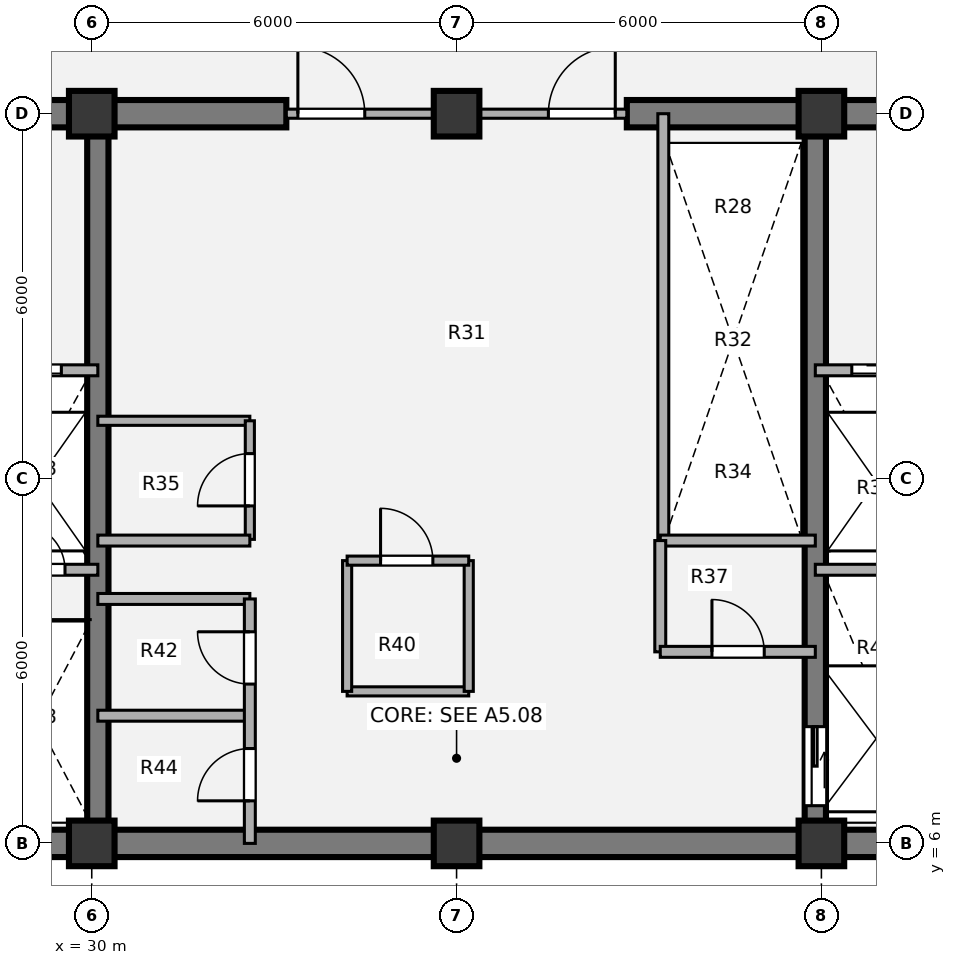
"""IFC4 building model, lengths in metres.
Left out: names, types, materials, properties, quantities, classifications, styles, units other than length and angle.
Written with IfcOpenShell. Run it as: python <this file> out.ifc"""

import sys

from ifc_helpers import new_model, si_unit, direction, frame, frame_2d, origin, origin_2d, place, context, subcontext, project, spatial, rectangle, extrude, source, transform, mapped, element, fill, save


model = new_model("IFC4")
c1 = context("Model", 3, precision=1e-05, world=origin(), true_north=direction((0.0, 1.0)))
c2 = subcontext(c1, "Body", "Model", "MODEL_VIEW")
j1 = project(units=[si_unit("LENGTHUNIT", "METRE"), si_unit("PLANEANGLEUNIT", "RADIAN")], contexts=[c1])
p1 = place(None, origin())
s1 = spatial("IfcSite", under=j1, at=p1, CompositionType="ELEMENT")
p2 = place(p1, origin())
s2 = spatial("IfcBuilding", under=s1, at=p2, CompositionType="ELEMENT")
p3 = place(p2, frame((0.0, 0.0, 194.22)))
s3 = spatial("IfcBuildingStorey", under=s2, at=p3, CompositionType="ELEMENT", Elevation=194.22)
m1 = source(origin(), c2, "Body", "SweptSolid", [
    extrude(rectangle(XDim=0.75, YDim=0.75, at=origin_2d()), origin(), (0.0, 0.0, 1.0), 3.78),
])
for number, where, z_axis, x_axis in (
    (1, (30.0, 6.0, 0.0), (0.0, 0.0, 1.0), (1.0, 0.0, 0.0)),
    (2, (36.0, 6.0, 0.0), (0.0, 0.0, 1.0), (1.0, 0.0, 0.0)),
    (3, (42.0, 6.0, 0.0), (0.0, 0.0, 1.0), (1.0, 0.0, 0.0)),
    (4, (30.0, 18.0, 0.0), (0.0, 0.0, 1.0), (1.0, 0.0, 0.0)),
    (5, (36.0, 18.0, 0.0), (0.0, 0.0, 1.0), (1.0, 0.0, 0.0)),
    (6, (42.0, 18.0, 0.0), (0.0, 0.0, 1.0), (1.0, 0.0, 0.0)),
):
    element("IfcColumn", number, at=place(p3, frame(where, z_axis=z_axis, x_axis=x_axis)), inside=s3, PredefinedType="COLUMN", context=c2, shape_type="MappedRepresentation", body=[
        mapped(m1, transform((0.0, 0.0, 0.0), x_axis=(1.0, 0.0, 0.0), y_axis=(0.0, 1.0, 0.0), z_axis=(0.0, 0.0, 1.0), scale=1.0)),
    ])
p4 = place(p3, frame((48.225, 6.0, 0.0), z_axis=(0.0, 0.0, 1.0), x_axis=(-1.0, 0.0, 0.0)))
e7 = element("IfcWall", 7, at=p4, inside=s3, PredefinedType="SHEAR", context=c2, shape_type="SweptSolid", body=[
    extrude(rectangle(XDim=24.45, YDim=0.45, at=frame_2d((12.225, 0.0))), origin(), (0.0, 0.0, 1.0), 3.78),
])
p5 = place(p3, frame((23.775, 18.0, 0.0), z_axis=(0.0, 0.0, 1.0), x_axis=(1.0, 0.0, 0.0)))
e8 = element("IfcWall", 8, at=p5, inside=s3, PredefinedType="SHEAR", context=c2, shape_type="SweptSolid", body=[
    extrude(rectangle(XDim=9.425, YDim=0.45, at=frame_2d((4.712, 0.0))), origin(), (0.0, 0.0, 1.0), 3.78),
])
p6 = place(p5, frame((2.95, 0.0, 0.0)))
e9 = element("IfcOpeningElement", 9, at=p6, cuts=e8, PredefinedType="OPENING", context=c2, shape_type="SweptSolid", body=[
    extrude(rectangle(XDim=1.1, YDim=2.1, at=origin_2d()), frame((0.55, 0.235, 1.05), z_axis=(0.0, -1.0, 0.0), x_axis=(1.0, 0.0, 0.0)), (0.0, 0.0, 1.0), 0.47),
])
p7 = place(p3, frame((38.8, 18.0, 0.0), z_axis=(0.0, 0.0, 1.0), x_axis=(1.0, 0.0, 0.0)))
e10 = element("IfcWall", 10, at=p7, inside=s3, PredefinedType="SHEAR", context=c2, shape_type="SweptSolid", body=[
    extrude(rectangle(XDim=9.425, YDim=0.45, at=frame_2d((4.712, 0.0))), origin(), (0.0, 0.0, 1.0), 3.78),
])
p8 = place(p7, frame((5.45, 0.0, 0.0)))
e11 = element("IfcOpeningElement", 11, at=p8, cuts=e10, PredefinedType="OPENING", context=c2, shape_type="SweptSolid", body=[
    extrude(rectangle(XDim=1.1, YDim=2.1, at=origin_2d()), frame((0.55, 0.235, 1.05), z_axis=(0.0, -1.0, 0.0), x_axis=(1.0, 0.0, 0.0)), (0.0, 0.0, 1.0), 0.47),
])
p9 = place(p3, frame((30.1, 6.0, 0.0), z_axis=(0.0, 0.0, 1.0), x_axis=(0.0, 1.0, 0.0)))
e12 = element("IfcWall", 12, at=p9, inside=s3, PredefinedType="SHEAR", context=c2, shape_type="SweptSolid", body=[
    extrude(rectangle(XDim=12.0, YDim=0.35, at=frame_2d((6.0, 0.0))), origin(), (0.0, 0.0, 1.0), 3.78),
])
p10 = place(p3, frame((41.9, 18.0, 0.0), z_axis=(0.0, 0.0, 1.0), x_axis=(0.0, -1.0, 0.0)))
e13 = element("IfcWall", 13, at=p10, inside=s3, PredefinedType="SHEAR", context=c2, shape_type="SweptSolid", body=[
    extrude(rectangle(XDim=12.0, YDim=0.35, at=frame_2d((6.0, 0.0))), origin(), (0.0, 0.0, 1.0), 3.78),
])
p11 = place(p10, frame((10.08, 0.0, 0.0)))
e14 = element("IfcOpeningElement", 14, at=p11, cuts=e13, PredefinedType="OPENING", context=c2, shape_type="SweptSolid", body=[
    extrude(rectangle(XDim=1.3, YDim=2.1, at=origin_2d()), frame((0.65, 0.185, 1.05), z_axis=(0.0, -1.0, 0.0), x_axis=(1.0, 0.0, 0.0)), (0.0, 0.0, 1.0), 0.37),
])
p12 = place(p3, frame((30.1, 12.95, 0.0), z_axis=(0.0, 0.0, 1.0), x_axis=(1.0, 0.0, 0.0)))
e15 = element("IfcWall", 15, at=p12, inside=s3, PredefinedType="PARTITIONING", context=c2, shape_type="SweptSolid", body=[
    extrude(rectangle(XDim=2.5, YDim=0.15, at=frame_2d((1.25, 0.0))), origin(), (0.0, 0.0, 1.0), 3.5),
])
p13 = place(p3, frame((32.6, 11.0, 0.0), z_axis=(0.0, 0.0, 1.0), x_axis=(0.0, 1.0, 0.0)))
e16 = element("IfcWall", 16, at=p13, inside=s3, PredefinedType="PARTITIONING", context=c2, shape_type="SweptSolid", body=[
    extrude(rectangle(XDim=1.95, YDim=0.15, at=frame_2d((0.975, 0.0))), origin(), (0.0, 0.0, 1.0), 3.5),
])
p14 = place(p13, frame((0.55, 0.0, 0.0)))
e17 = element("IfcOpeningElement", 17, at=p14, cuts=e16, PredefinedType="OPENING", context=c2, shape_type="SweptSolid", body=[
    extrude(rectangle(XDim=0.86, YDim=2.1, at=origin_2d()), frame((0.43, 0.085, 1.05), z_axis=(0.0, -1.0, 0.0), x_axis=(1.0, 0.0, 0.0)), (0.0, 0.0, 1.0), 0.17),
])
p15 = place(p3, frame((34.2, 8.5, 0.0), z_axis=(0.0, 0.0, 1.0), x_axis=(1.0, 0.0, 0.0)))
e18 = element("IfcWall", 18, at=p15, inside=s3, PredefinedType="PARTITIONING", context=c2, shape_type="SweptSolid", body=[
    extrude(rectangle(XDim=2.0, YDim=0.15, at=frame_2d((1.0, 0.0))), origin(), (0.0, 0.0, 1.0), 3.5),
])
p16 = place(p3, frame((34.2, 8.5, 0.0), z_axis=(0.0, 0.0, 1.0), x_axis=(0.0, 1.0, 0.0)))
e19 = element("IfcWall", 19, at=p16, inside=s3, PredefinedType="PARTITIONING", context=c2, shape_type="SweptSolid", body=[
    extrude(rectangle(XDim=2.15, YDim=0.15, at=frame_2d((1.075, 0.0))), origin(), (0.0, 0.0, 1.0), 3.5),
])
p17 = place(p3, frame((36.2, 8.5, 0.0), z_axis=(0.0, 0.0, 1.0), x_axis=(0.0, 1.0, 0.0)))
e20 = element("IfcWall", 20, at=p17, inside=s3, PredefinedType="PARTITIONING", context=c2, shape_type="SweptSolid", body=[
    extrude(rectangle(XDim=2.15, YDim=0.15, at=frame_2d((1.075, 0.0))), origin(), (0.0, 0.0, 1.0), 2.715),
])
p18 = place(p3, frame((34.2, 10.65, 0.0), z_axis=(0.0, 0.0, 1.0), x_axis=(1.0, 0.0, 0.0)))
e21 = element("IfcWall", 21, at=p18, inside=s3, PredefinedType="PARTITIONING", context=c2, shape_type="SweptSolid", body=[
    extrude(rectangle(XDim=2.0, YDim=0.15, at=frame_2d((1.0, 0.0))), origin(), (0.0, 0.0, 1.0), 3.5),
])
p19 = place(p18, frame((0.55, 0.0, 0.0)))
e22 = element("IfcOpeningElement", 22, at=p19, cuts=e21, PredefinedType="OPENING", context=c2, shape_type="SweptSolid", body=[
    extrude(rectangle(XDim=0.86, YDim=2.1, at=origin_2d()), frame((0.43, 0.085, 1.05), z_axis=(0.0, -1.0, 0.0), x_axis=(1.0, 0.0, 0.0)), (0.0, 0.0, 1.0), 0.17),
])
p20 = place(p3, frame((39.4, 11.0, 0.0), z_axis=(0.0, 0.0, 1.0), x_axis=(0.0, 1.0, 0.0)))
e23 = element("IfcWall", 23, at=p20, inside=s3, PredefinedType="PARTITIONING", context=c2, shape_type="SweptSolid", body=[
    extrude(rectangle(XDim=7.0, YDim=0.18, at=frame_2d((3.5, 0.0))), origin(), (0.0, 0.0, 1.0), 3.5),
])
p21 = place(p3, frame((30.1, 10.98, 0.0), z_axis=(0.0, 0.0, 1.0), x_axis=(1.0, 0.0, 0.0)))
e24 = element("IfcWall", 24, at=p21, inside=s3, PredefinedType="PARTITIONING", context=c2, shape_type="SweptSolid", body=[
    extrude(rectangle(XDim=2.5, YDim=0.18, at=frame_2d((1.25, 0.0))), origin(), (0.0, 0.0, 1.0), 3.5),
])
p22 = place(p3, frame((39.35, 10.98, 0.0), z_axis=(0.0, 0.0, 1.0), x_axis=(1.0, 0.0, 0.0)))
e25 = element("IfcWall", 25, at=p22, inside=s3, PredefinedType="PARTITIONING", context=c2, shape_type="SweptSolid", body=[
    extrude(rectangle(XDim=2.55, YDim=0.18, at=frame_2d((1.275, 0.0))), origin(), (0.0, 0.0, 1.0), 3.5),
])
for number, where, z_axis, x_axis in (
    (26, (30.1, 8.1, 0.0), (0.0, 0.0, 1.0), (1.0, 0.0, 0.0)),
    (27, (30.1, 10.02, 0.0), (0.0, 0.0, 1.0), (1.0, 0.0, 0.0)),
):
    element("IfcWall", number, at=place(p3, frame(where, z_axis=z_axis, x_axis=x_axis)), inside=s3, PredefinedType="PARTITIONING", context=c2, shape_type="SweptSolid", body=[
        extrude(rectangle(XDim=2.5, YDim=0.18, at=frame_2d((1.25, 0.0))), origin(), (0.0, 0.0, 1.0), 3.5),
    ])
p23 = place(p3, frame((32.6, 6.0, 0.0), z_axis=(0.0, 0.0, 1.0), x_axis=(0.0, 1.0, 0.0)))
e28 = element("IfcWall", 28, at=p23, inside=s3, PredefinedType="PARTITIONING", context=c2, shape_type="SweptSolid", body=[
    extrude(rectangle(XDim=4.02, YDim=0.18, at=frame_2d((2.01, 0.0))), origin(), (0.0, 0.0, 1.0), 3.5),
])
p24 = place(p23, frame((0.7, 0.0, 0.0)))
e29 = element("IfcOpeningElement", 29, at=p24, cuts=e28, PredefinedType="OPENING", context=c2, shape_type="SweptSolid", body=[
    extrude(rectangle(XDim=0.86, YDim=2.1, at=origin_2d()), frame((0.43, 0.1, 1.05), z_axis=(0.0, -1.0, 0.0), x_axis=(1.0, 0.0, 0.0)), (0.0, 0.0, 1.0), 0.2),
])
p25 = place(p23, frame((2.62, 0.0, 0.0)))
e30 = element("IfcOpeningElement", 30, at=p25, cuts=e28, PredefinedType="OPENING", context=c2, shape_type="SweptSolid", body=[
    extrude(rectangle(XDim=0.86, YDim=2.1, at=origin_2d()), frame((0.43, 0.1, 1.05), z_axis=(0.0, -1.0, 0.0), x_axis=(1.0, 0.0, 0.0)), (0.0, 0.0, 1.0), 0.2),
])
p26 = place(p3, frame((39.35, 9.15, 0.0), z_axis=(0.0, 0.0, 1.0), x_axis=(0.0, 1.0, 0.0)))
e31 = element("IfcWall", 31, at=p26, inside=s3, PredefinedType="PARTITIONING", context=c2, shape_type="SweptSolid", body=[
    extrude(rectangle(XDim=1.83, YDim=0.18, at=frame_2d((0.915, 0.0))), origin(), (0.0, 0.0, 1.0), 3.5),
])
p27 = place(p3, frame((39.35, 9.15, 0.0), z_axis=(0.0, 0.0, 1.0), x_axis=(1.0, 0.0, 0.0)))
e32 = element("IfcWall", 32, at=p27, inside=s3, PredefinedType="PARTITIONING", context=c2, shape_type="SweptSolid", body=[
    extrude(rectangle(XDim=2.55, YDim=0.18, at=frame_2d((1.275, 0.0))), origin(), (0.0, 0.0, 1.0), 3.5),
])
p28 = place(p27, frame((0.85, 0.0, 0.0)))
e33 = element("IfcOpeningElement", 33, at=p28, cuts=e32, PredefinedType="OPENING", context=c2, shape_type="SweptSolid", body=[
    extrude(rectangle(XDim=0.86, YDim=2.1, at=origin_2d()), frame((0.43, 0.1, 1.05), z_axis=(0.0, -1.0, 0.0), x_axis=(1.0, 0.0, 0.0)), (0.0, 0.0, 1.0), 0.2),
])
p29 = place(p3, frame((33.2, 18.0, 0.0), z_axis=(0.0, 0.0, 1.0), x_axis=(1.0, 0.0, 0.0)))
e34 = element("IfcWall", 34, at=p29, inside=s3, PredefinedType="PARTITIONING", context=c2, shape_type="SweptSolid", body=[
    extrude(rectangle(XDim=5.6, YDim=0.15, at=frame_2d((2.8, 0.0))), origin(), (0.0, 0.0, 1.0), 2.515),
])
p30 = place(p29, frame((0.19, 0.0, 0.0)))
e35 = element("IfcOpeningElement", 35, at=p30, cuts=e34, PredefinedType="OPENING", context=c2, shape_type="SweptSolid", body=[
    extrude(rectangle(XDim=1.1, YDim=2.1, at=origin_2d()), frame((0.55, 0.085, 1.05), z_axis=(0.0, -1.0, 0.0), x_axis=(1.0, 0.0, 0.0)), (0.0, 0.0, 1.0), 0.17),
])
p31 = place(p29, frame((4.31, 0.0, 0.0)))
e36 = element("IfcOpeningElement", 36, at=p31, cuts=e34, PredefinedType="OPENING", context=c2, shape_type="SweptSolid", body=[
    extrude(rectangle(XDim=1.1, YDim=2.1, at=origin_2d()), frame((0.55, 0.085, 1.05), z_axis=(0.0, -1.0, 0.0), x_axis=(1.0, 0.0, 0.0)), (0.0, 0.0, 1.0), 0.17),
])
p32 = place(p3, frame((24.0, 13.78, 0.0), z_axis=(0.0, 0.0, 1.0), x_axis=(1.0, 0.0, 0.0)))
e37 = element("IfcWall", 37, at=p32, inside=s3, PredefinedType="PARTITIONING", context=c2, shape_type="SweptSolid", body=[
    extrude(rectangle(XDim=6.1, YDim=0.18, at=frame_2d((3.05, 0.0))), origin(), (0.0, 0.0, 1.0), 3.5),
])
p33 = place(p32, frame((1.15, 0.0, 0.0)))
e38 = element("IfcOpeningElement", 38, at=p33, cuts=e37, PredefinedType="OPENING", context=c2, shape_type="SweptSolid", body=[
    extrude(rectangle(XDim=1.1, YDim=2.1, at=origin_2d()), frame((0.55, 0.1, 1.05), z_axis=(0.0, -1.0, 0.0), x_axis=(1.0, 0.0, 0.0)), (0.0, 0.0, 1.0), 0.2),
])
p34 = place(p32, frame((4.4, 0.0, 0.0)))
e39 = element("IfcOpeningElement", 39, at=p34, cuts=e37, PredefinedType="OPENING", context=c2, shape_type="SweptSolid", body=[
    extrude(rectangle(XDim=1.1, YDim=2.1, at=origin_2d()), frame((0.55, 0.1, 1.05), z_axis=(0.0, -1.0, 0.0), x_axis=(1.0, 0.0, 0.0)), (0.0, 0.0, 1.0), 0.2),
])
p35 = place(p3, frame((28.15, 10.5, 0.0), z_axis=(0.0, 0.0, 1.0), x_axis=(1.0, 0.0, 0.0)))
e40 = element("IfcWall", 40, at=p35, inside=s3, PredefinedType="PARTITIONING", context=c2, shape_type="SweptSolid", body=[
    extrude(rectangle(XDim=1.95, YDim=0.18, at=frame_2d((0.975, 0.0))), origin(), (0.0, 0.0, 1.0), 3.5),
])
p36 = place(p35, frame((0.65, 0.0, 0.0)))
e41 = element("IfcOpeningElement", 41, at=p36, cuts=e40, PredefinedType="OPENING", context=c2, shape_type="SweptSolid", body=[
    extrude(rectangle(XDim=0.76, YDim=2.05, at=origin_2d()), frame((0.38, 0.1, 1.025), z_axis=(0.0, -1.0, 0.0), x_axis=(1.0, 0.0, 0.0)), (0.0, 0.0, 1.0), 0.2),
])
p37 = place(p3, frame((41.9, 13.78, 0.0), z_axis=(0.0, 0.0, 1.0), x_axis=(1.0, 0.0, 0.0)))
e42 = element("IfcWall", 42, at=p37, inside=s3, PredefinedType="PARTITIONING", context=c2, shape_type="SweptSolid", body=[
    extrude(rectangle(XDim=6.1, YDim=0.18, at=frame_2d((3.05, 0.0))), origin(), (0.0, 0.0, 1.0), 3.5),
])
p38 = place(p37, frame((0.6, 0.0, 0.0)))
e43 = element("IfcOpeningElement", 43, at=p38, cuts=e42, PredefinedType="OPENING", context=c2, shape_type="SweptSolid", body=[
    extrude(rectangle(XDim=1.1, YDim=2.1, at=origin_2d()), frame((0.55, 0.1, 1.05), z_axis=(0.0, -1.0, 0.0), x_axis=(1.0, 0.0, 0.0)), (0.0, 0.0, 1.0), 0.2),
])
p39 = place(p37, frame((3.8, 0.0, 0.0)))
e44 = element("IfcOpeningElement", 44, at=p39, cuts=e42, PredefinedType="OPENING", context=c2, shape_type="SweptSolid", body=[
    extrude(rectangle(XDim=1.1, YDim=2.1, at=origin_2d()), frame((0.55, 0.1, 1.05), z_axis=(0.0, -1.0, 0.0), x_axis=(1.0, 0.0, 0.0)), (0.0, 0.0, 1.0), 0.2),
])
p40 = place(p3, frame((41.9, 10.5, 0.0), z_axis=(0.0, 0.0, 1.0), x_axis=(1.0, 0.0, 0.0)))
e45 = element("IfcWall", 45, at=p40, inside=s3, PredefinedType="PARTITIONING", context=c2, shape_type="SweptSolid", body=[
    extrude(rectangle(XDim=1.95, YDim=0.18, at=frame_2d((0.975, 0.0))), origin(), (0.0, 0.0, 1.0), 3.5),
])
m2 = source(origin(), c2, "Body", "SweptSolid", [
    extrude(rectangle(XDim=0.86, YDim=2.1, at=origin_2d()), frame((0.43, 0.025, 1.05), z_axis=(0.0, -1.0, 0.0), x_axis=(1.0, 0.0, 0.0)), (0.0, 0.0, 1.0), 0.05),
])
p41 = place(p14, origin())
e46 = element("IfcDoor", 46, at=p41, inside=s3, OperationType="SINGLE_SWING_LEFT", PredefinedType="DOOR", context=c2, shape_type="MappedRepresentation", body=[
    mapped(m2, transform((0.0, 0.0, 0.0), x_axis=(1.0, 0.0, 0.0), y_axis=(0.0, 1.0, 0.0), z_axis=(0.0, 0.0, 1.0), scale=1.0)),
])
fill(e17, e46)
p42 = place(p19, origin())
e47 = element("IfcDoor", 47, at=p42, inside=s3, OperationType="SINGLE_SWING_LEFT", PredefinedType="DOOR", context=c2, shape_type="MappedRepresentation", body=[
    mapped(m2, transform((0.0, 0.0, 0.0), x_axis=(1.0, 0.0, 0.0), y_axis=(0.0, 1.0, 0.0), z_axis=(0.0, 0.0, 1.0), scale=1.0)),
])
fill(e22, e47)
p43 = place(p24, origin())
e48 = element("IfcDoor", 48, at=p43, inside=s3, OperationType="SINGLE_SWING_LEFT", PredefinedType="DOOR", context=c2, shape_type="MappedRepresentation", body=[
    mapped(m2, transform((0.0, 0.0, 0.0), x_axis=(1.0, 0.0, 0.0), y_axis=(0.0, 1.0, 0.0), z_axis=(0.0, 0.0, 1.0), scale=1.0)),
])
fill(e29, e48)
p44 = place(p25, origin())
e49 = element("IfcDoor", 49, at=p44, inside=s3, OperationType="SINGLE_SWING_RIGHT", PredefinedType="DOOR", context=c2, shape_type="MappedRepresentation", body=[
    mapped(m2, transform((0.0, 0.0, 0.0), x_axis=(1.0, 0.0, 0.0), y_axis=(0.0, 1.0, 0.0), z_axis=(0.0, 0.0, 1.0), scale=1.0)),
])
fill(e30, e49)
p45 = place(p28, origin())
e50 = element("IfcDoor", 50, at=p45, inside=s3, OperationType="SINGLE_SWING_LEFT", PredefinedType="DOOR", context=c2, shape_type="MappedRepresentation", body=[
    mapped(m2, transform((0.0, 0.0, 0.0), x_axis=(1.0, 0.0, 0.0), y_axis=(0.0, 1.0, 0.0), z_axis=(0.0, 0.0, 1.0), scale=1.0)),
])
fill(e33, e50)
m3 = source(origin(), c2, "Body", "SweptSolid", [
    extrude(rectangle(XDim=1.1, YDim=2.1, at=origin_2d()), frame((0.55, 0.025, 1.05), z_axis=(0.0, -1.0, 0.0), x_axis=(1.0, 0.0, 0.0)), (0.0, 0.0, 1.0), 0.05),
])
p46 = place(p30, origin())
e51 = element("IfcDoor", 51, at=p46, inside=s3, OperationType="SINGLE_SWING_LEFT", PredefinedType="DOOR", context=c2, shape_type="MappedRepresentation", body=[
    mapped(m3, transform((0.0, 0.0, 0.0), x_axis=(1.0, 0.0, 0.0), y_axis=(0.0, 1.0, 0.0), z_axis=(0.0, 0.0, 1.0), scale=1.0)),
])
fill(e35, e51)
p47 = place(p31, origin())
e52 = element("IfcDoor", 52, at=p47, inside=s3, OperationType="SINGLE_SWING_RIGHT", PredefinedType="DOOR", context=c2, shape_type="MappedRepresentation", body=[
    mapped(m3, transform((0.0, 0.0, 0.0), x_axis=(1.0, 0.0, 0.0), y_axis=(0.0, 1.0, 0.0), z_axis=(0.0, 0.0, 1.0), scale=1.0)),
])
fill(e36, e52)
m4 = source(origin(), c2, "Body", "SweptSolid", [
    extrude(rectangle(XDim=1.1, YDim=2.1, at=origin_2d()), frame((0.55, 0.025, 1.05), z_axis=(0.0, -1.0, 0.0), x_axis=(1.0, 0.0, 0.0)), (0.0, 0.0, 1.0), 0.05),
])
p48 = place(p34, origin())
e53 = element("IfcDoor", 53, at=p48, inside=s3, OperationType="SLIDING_TO_LEFT", PredefinedType="DOOR", context=c2, shape_type="MappedRepresentation", body=[
    mapped(m4, transform((0.0, 0.0, 0.0), x_axis=(1.0, 0.0, 0.0), y_axis=(0.0, 1.0, 0.0), z_axis=(0.0, 0.0, 1.0), scale=1.0)),
])
fill(e39, e53)
m5 = source(origin(), c2, "Body", "SweptSolid", [
    extrude(rectangle(XDim=0.76, YDim=2.05, at=origin_2d()), frame((0.38, 0.025, 1.025), z_axis=(0.0, -1.0, 0.0), x_axis=(1.0, 0.0, 0.0)), (0.0, 0.0, 1.0), 0.05),
])
p49 = place(p36, origin())
e54 = element("IfcDoor", 54, at=p49, inside=s3, OperationType="SINGLE_SWING_LEFT", PredefinedType="DOOR", context=c2, shape_type="MappedRepresentation", body=[
    mapped(m5, transform((0.0, 0.0, 0.0), x_axis=(1.0, 0.0, 0.0), y_axis=(0.0, 1.0, 0.0), z_axis=(0.0, 0.0, 1.0), scale=1.0)),
])
fill(e41, e54)
p50 = place(p38, origin())
e55 = element("IfcDoor", 55, at=p50, inside=s3, OperationType="SLIDING_TO_RIGHT", PredefinedType="DOOR", context=c2, shape_type="MappedRepresentation", body=[
    mapped(m4, transform((0.0, 0.0, 0.0), x_axis=(1.0, 0.0, 0.0), y_axis=(0.0, 1.0, 0.0), z_axis=(0.0, 0.0, 1.0), scale=1.0)),
])
fill(e43, e55)
m6 = source(origin(), c2, "Body", "SweptSolid", [
    extrude(rectangle(XDim=1.3, YDim=2.1, at=origin_2d()), frame((0.65, 0.025, 1.05), z_axis=(0.0, -1.0, 0.0), x_axis=(1.0, 0.0, 0.0)), (0.0, 0.0, 1.0), 0.05),
])
p51 = place(p11, origin())
e56 = element("IfcDoor", 56, at=p51, inside=s3, OperationType="SLIDING_TO_LEFT", PredefinedType="DOOR", context=c2, shape_type="MappedRepresentation", body=[
    mapped(m6, transform((0.0, 0.0, 0.0), x_axis=(1.0, 0.0, 0.0), y_axis=(0.0, 1.0, 0.0), z_axis=(0.0, 0.0, 1.0), scale=1.0)),
])
fill(e14, e56)
save(model, sys.argv[1])
